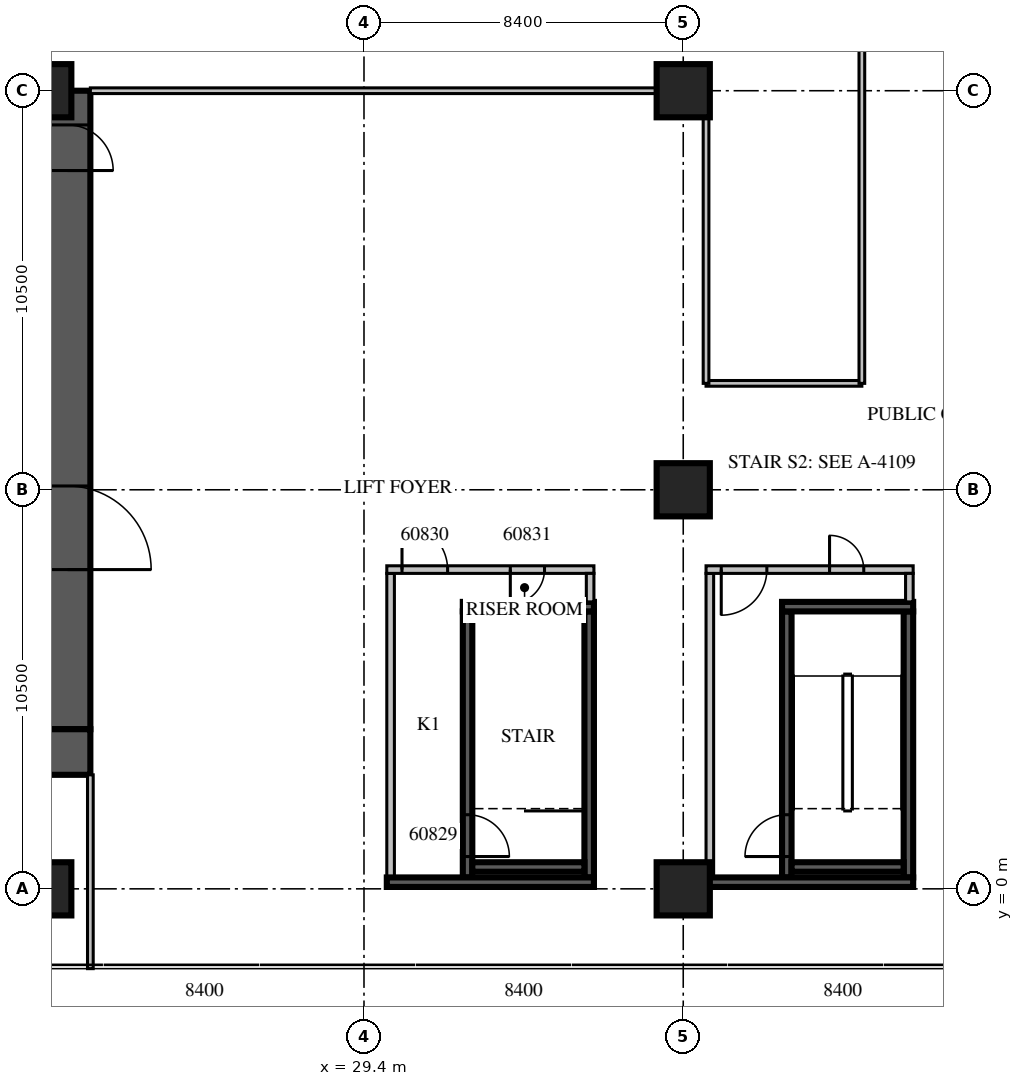
"""IFC4 building model, lengths in metres.
Left out: names, types, materials, properties, quantities, classifications, styles, units other than length and angle.
Written with IfcOpenShell. Run it as: python <this file> out.ifc"""

import sys

from ifc_helpers import new_model, si_unit, direction, frame, frame_2d, origin, origin_2d, place, context, subcontext, project, spatial, rectangle, extrude, source, transform, mapped, element, fill, save


model = new_model("IFC4")
c1 = context("Model", 3, precision=1e-05, world=origin(), true_north=direction((0.0, 1.0)))
c2 = subcontext(c1, "Body", "Model", "MODEL_VIEW")
j1 = project(units=[si_unit("LENGTHUNIT", "METRE"), si_unit("PLANEANGLEUNIT", "RADIAN")], contexts=[c1])
p1 = place(None, origin())
s1 = spatial("IfcSite", under=j1, at=p1, CompositionType="ELEMENT")
p2 = place(p1, origin())
s2 = spatial("IfcBuilding", under=s1, at=p2, CompositionType="ELEMENT")
p3 = place(p2, frame((0.0, 0.0, 29.1)))
s3 = spatial("IfcBuildingStorey", under=s2, at=p3, CompositionType="ELEMENT", Elevation=29.1)
m1 = source(origin(), c2, "Body", "SweptSolid", [
    extrude(rectangle(XDim=1.4, YDim=1.4, at=origin_2d()), origin(), (0.0, 0.0, 1.0), 5.4),
])
for number, where, z_axis, x_axis in (
    (1, (21.0, 0.0, 0.0), (0.0, 0.0, 1.0), (1.0, 0.0, 0.0)),
    (2, (21.0, 21.0, 0.0), (0.0, 0.0, 1.0), (1.0, 0.0, 0.0)),
    (3, (37.8, 0.0, 0.0), (0.0, 0.0, 1.0), (1.0, 0.0, 0.0)),
    (4, (37.8, 10.5, 0.0), (0.0, 0.0, 1.0), (1.0, 0.0, 0.0)),
    (5, (37.8, 21.0, 0.0), (0.0, 0.0, 1.0), (1.0, 0.0, 0.0)),
):
    element("IfcColumn", number, at=place(p3, frame(where, z_axis=z_axis, x_axis=x_axis)), inside=s3, PredefinedType="COLUMN", context=c2, shape_type="MappedRepresentation", body=[
        mapped(m1, transform((0.0, 0.0, 0.0), scale=1.0)),
    ])
m2 = source(origin(), c2, "Body", "SweptSolid", [
    extrude(rectangle(XDim=16.8, YDim=1.2, at=frame_2d((8.4, 0.0))), origin(), (0.0, 0.0, 1.0), 5.4),
])
p4 = place(p3, frame((21.6, 4.2, 0.0), z_axis=(0.0, 0.0, 1.0), x_axis=(0.0, 1.0, 0.0)))
e6 = element("IfcWall", 6, at=p4, inside=s3, PredefinedType="SHEAR", context=c2, shape_type="MappedRepresentation", body=[
    mapped(m2, transform((0.0, 0.0, 0.0), scale=1.0)),
])
m3 = source(origin(), c2, "Body", "SweptSolid", [
    extrude(rectangle(XDim=2.2, YDim=2.1, at=frame_2d((1.1, 1.05))), frame((0.0, 0.61, 0.0), z_axis=(0.0, -1.0, 0.0), x_axis=(1.0, 0.0, 0.0)), (0.0, 0.0, 1.0), 1.22),
])
p5 = place(p4, frame((4.2, 0.0, 0.0)))
e7 = element("IfcOpeningElement", 7, at=p5, cuts=e6, PredefinedType="OPENING", context=c2, shape_type="MappedRepresentation", body=[
    mapped(m3, transform((0.0, 0.0, 0.0), scale=1.0)),
])
m4 = source(origin(), c2, "Body", "SweptSolid", [
    extrude(rectangle(XDim=1.2, YDim=2.1, at=frame_2d((0.6, 1.05))), frame((0.0, 0.61, 0.0), z_axis=(0.0, -1.0, 0.0), x_axis=(1.0, 0.0, 0.0)), (0.0, 0.0, 1.0), 1.22),
])
p6 = place(p4, frame((14.7, 0.0, 0.0)))
e8 = element("IfcOpeningElement", 8, at=p6, cuts=e6, PredefinedType="OPENING", context=c2, shape_type="MappedRepresentation", body=[
    mapped(m4, transform((0.0, 0.0, 0.0), scale=1.0)),
])
m5 = source(origin(), c2, "Body", "SweptSolid", [
    extrude(rectangle(XDim=18.0, YDim=1.2, at=frame_2d((9.0, 0.0))), origin(), (0.0, 0.0, 1.0), 5.4),
])
p7 = place(p3, frame((4.2, 3.6, 0.0), z_axis=(0.0, 0.0, 1.0), x_axis=(1.0, 0.0, 0.0)))
e9 = element("IfcWall", 9, at=p7, inside=s3, PredefinedType="SHEAR", context=c2, shape_type="MappedRepresentation", body=[
    mapped(m5, transform((0.0, 0.0, 0.0), scale=1.0)),
])
m6 = source(origin(), c2, "Body", "SweptSolid", [
    extrude(rectangle(XDim=7.0, YDim=0.25, at=frame_2d((3.5, 0.0))), origin(), (0.0, 0.0, 1.0), 4.8),
])
p8 = place(p3, frame((40.525, 0.3, 0.0), z_axis=(0.0, 0.0, 1.0), x_axis=(0.0, 1.0, 0.0)))
e10 = element("IfcWall", 10, at=p8, inside=s3, PredefinedType="SOLIDWALL", context=c2, shape_type="MappedRepresentation", body=[
    mapped(m6, transform((0.0, 0.0, 0.0), scale=1.0)),
])
m7 = source(origin(), c2, "Body", "SweptSolid", [
    extrude(rectangle(XDim=1.1, YDim=2.1, at=frame_2d((0.55, 1.05))), frame((0.0, 0.135, 0.0), z_axis=(0.0, -1.0, 0.0), x_axis=(1.0, 0.0, 0.0)), (0.0, 0.0, 1.0), 0.27),
])
p9 = place(p8, frame((0.55, 0.0, 0.0)))
e11 = element("IfcOpeningElement", 11, at=p9, cuts=e10, PredefinedType="OPENING", context=c2, shape_type="MappedRepresentation", body=[
    mapped(m7, transform((0.0, 0.0, 0.0), scale=1.0)),
])
p10 = place(p3, frame((43.725, 0.3, 0.0), z_axis=(0.0, 0.0, 1.0), x_axis=(0.0, 1.0, 0.0)))
e12 = element("IfcWall", 12, at=p10, inside=s3, PredefinedType="SOLIDWALL", context=c2, shape_type="MappedRepresentation", body=[
    mapped(m6, transform((0.0, 0.0, 0.0), scale=1.0)),
])
m8 = source(origin(), c2, "Body", "SweptSolid", [
    extrude(rectangle(XDim=3.45, YDim=0.25, at=frame_2d((1.725, 0.0))), origin(), (0.0, 0.0, 1.0), 4.8),
])
p11 = place(p3, frame((40.4, 7.425, 0.0), z_axis=(0.0, 0.0, 1.0), x_axis=(1.0, 0.0, 0.0)))
e13 = element("IfcWall", 13, at=p11, inside=s3, PredefinedType="SOLIDWALL", context=c2, shape_type="MappedRepresentation", body=[
    mapped(m8, transform((0.0, 0.0, 0.0), scale=1.0)),
])
m9 = source(origin(), c2, "Body", "SweptSolid", [
    extrude(rectangle(XDim=2.95, YDim=0.25, at=frame_2d((1.475, 0.0))), origin(), (0.0, 0.0, 1.0), 4.8),
])
p12 = place(p3, frame((40.65, 0.575, 0.0), z_axis=(0.0, 0.0, 1.0), x_axis=(1.0, 0.0, 0.0)))
e14 = element("IfcWall", 14, at=p12, inside=s3, PredefinedType="SOLIDWALL", context=c2, shape_type="MappedRepresentation", body=[
    mapped(m9, transform((0.0, 0.0, 0.0), scale=1.0)),
])
m10 = source(origin(), c2, "Body", "SweptSolid", [
    extrude(rectangle(XDim=8.0, YDim=0.2, at=frame_2d((4.0, 0.0))), origin(), (0.0, 0.0, 1.0), 4.8),
])
p13 = place(p3, frame((38.5, 0.3, 0.0), z_axis=(0.0, 0.0, 1.0), x_axis=(0.0, 1.0, 0.0)))
e15 = element("IfcWall", 15, at=p13, inside=s3, PredefinedType="PARTITIONING", context=c2, shape_type="MappedRepresentation", body=[
    mapped(m10, transform((0.0, 0.0, 0.0), scale=1.0)),
])
m11 = source(origin(), c2, "Body", "SweptSolid", [
    extrude(rectangle(XDim=5.45, YDim=0.2, at=frame_2d((2.725, 0.0))), origin(), (0.0, 0.0, 1.0), 4.8),
])
p14 = place(p3, frame((38.4, 8.4, 0.0), z_axis=(0.0, 0.0, 1.0), x_axis=(1.0, 0.0, 0.0)))
e16 = element("IfcWall", 16, at=p14, inside=s3, PredefinedType="PARTITIONING", context=c2, shape_type="MappedRepresentation", body=[
    mapped(m11, transform((0.0, 0.0, 0.0), scale=1.0)),
])
m12 = source(origin(), c2, "Body", "SweptSolid", [
    extrude(rectangle(XDim=1.2, YDim=2.1, at=frame_2d((0.6, 1.05))), frame((0.0, 0.11, 0.0), z_axis=(0.0, -1.0, 0.0), x_axis=(1.0, 0.0, 0.0)), (0.0, 0.0, 1.0), 0.22),
])
p15 = place(p14, frame((0.4, 0.0, 0.0)))
e17 = element("IfcOpeningElement", 17, at=p15, cuts=e16, PredefinedType="OPENING", context=c2, shape_type="MappedRepresentation", body=[
    mapped(m12, transform((0.0, 0.0, 0.0), scale=1.0)),
])
m13 = source(origin(), c2, "Body", "SweptSolid", [
    extrude(rectangle(XDim=0.9, YDim=2.1, at=frame_2d((0.45, 1.05))), frame((0.0, 0.11, 0.0), z_axis=(0.0, -1.0, 0.0), x_axis=(1.0, 0.0, 0.0)), (0.0, 0.0, 1.0), 0.22),
])
p16 = place(p14, frame((3.25, 0.0, 0.0)))
e18 = element("IfcOpeningElement", 18, at=p16, cuts=e16, PredefinedType="OPENING", context=c2, shape_type="MappedRepresentation", body=[
    mapped(m13, transform((0.0, 0.0, 0.0), scale=1.0)),
])
m14 = source(origin(), c2, "Body", "SweptSolid", [
    extrude(rectangle(XDim=0.75, YDim=0.2, at=frame_2d((0.375, 0.0))), origin(), (0.0, 0.0, 1.0), 4.8),
])
p17 = place(p3, frame((43.75, 7.55, 0.0), z_axis=(0.0, 0.0, 1.0), x_axis=(0.0, 1.0, 0.0)))
e19 = element("IfcWall", 19, at=p17, inside=s3, PredefinedType="PARTITIONING", context=c2, shape_type="MappedRepresentation", body=[
    mapped(m14, transform((0.0, 0.0, 0.0), scale=1.0)),
])
m15 = source(origin(), c2, "Body", "SweptSolid", [
    extrude(rectangle(XDim=5.45, YDim=0.25, at=frame_2d((2.725, 0.0))), origin(), (0.0, 0.0, 1.0), 4.8),
])
p18 = place(p3, frame((38.4, 0.175, 0.0), z_axis=(0.0, 0.0, 1.0), x_axis=(1.0, 0.0, 0.0)))
e20 = element("IfcWall", 20, at=p18, inside=s3, PredefinedType="SOLIDWALL", context=c2, shape_type="MappedRepresentation", body=[
    mapped(m15, transform((0.0, 0.0, 0.0), scale=1.0)),
])
p19 = place(p3, frame((32.125, 0.3, 0.0), z_axis=(0.0, 0.0, 1.0), x_axis=(0.0, 1.0, 0.0)))
e21 = element("IfcWall", 21, at=p19, inside=s3, PredefinedType="SOLIDWALL", context=c2, shape_type="MappedRepresentation", body=[
    mapped(m6, transform((0.0, 0.0, 0.0), scale=1.0)),
])
p20 = place(p19, frame((0.55, 0.0, 0.0)))
e22 = element("IfcOpeningElement", 22, at=p20, cuts=e21, PredefinedType="OPENING", context=c2, shape_type="MappedRepresentation", body=[
    mapped(m7, transform((0.0, 0.0, 0.0), scale=1.0)),
])
p21 = place(p3, frame((35.325, 0.3, 0.0), z_axis=(0.0, 0.0, 1.0), x_axis=(0.0, 1.0, 0.0)))
e23 = element("IfcWall", 23, at=p21, inside=s3, PredefinedType="SOLIDWALL", context=c2, shape_type="MappedRepresentation", body=[
    mapped(m6, transform((0.0, 0.0, 0.0), scale=1.0)),
])
p22 = place(p3, frame((32.0, 7.425, 0.0), z_axis=(0.0, 0.0, 1.0), x_axis=(1.0, 0.0, 0.0)))
e24 = element("IfcWall", 24, at=p22, inside=s3, PredefinedType="SOLIDWALL", context=c2, shape_type="MappedRepresentation", body=[
    mapped(m8, transform((0.0, 0.0, 0.0), scale=1.0)),
])
p23 = place(p3, frame((32.25, 0.575, 0.0), z_axis=(0.0, 0.0, 1.0), x_axis=(1.0, 0.0, 0.0)))
e25 = element("IfcWall", 25, at=p23, inside=s3, PredefinedType="SOLIDWALL", context=c2, shape_type="MappedRepresentation", body=[
    mapped(m9, transform((0.0, 0.0, 0.0), scale=1.0)),
])
p24 = place(p3, frame((30.1, 0.3, 0.0), z_axis=(0.0, 0.0, 1.0), x_axis=(0.0, 1.0, 0.0)))
e26 = element("IfcWall", 26, at=p24, inside=s3, PredefinedType="PARTITIONING", context=c2, shape_type="MappedRepresentation", body=[
    mapped(m10, transform((0.0, 0.0, 0.0), scale=1.0)),
])
p25 = place(p3, frame((30.0, 8.4, 0.0), z_axis=(0.0, 0.0, 1.0), x_axis=(1.0, 0.0, 0.0)))
e27 = element("IfcWall", 27, at=p25, inside=s3, PredefinedType="PARTITIONING", context=c2, shape_type="MappedRepresentation", body=[
    mapped(m11, transform((0.0, 0.0, 0.0), scale=1.0)),
])
p26 = place(p25, frame((0.4, 0.0, 0.0)))
e28 = element("IfcOpeningElement", 28, at=p26, cuts=e27, PredefinedType="OPENING", context=c2, shape_type="MappedRepresentation", body=[
    mapped(m12, transform((0.0, 0.0, 0.0), scale=1.0)),
])
p27 = place(p25, frame((3.25, 0.0, 0.0)))
e29 = element("IfcOpeningElement", 29, at=p27, cuts=e27, PredefinedType="OPENING", context=c2, shape_type="MappedRepresentation", body=[
    mapped(m13, transform((0.0, 0.0, 0.0), scale=1.0)),
])
p28 = place(p3, frame((35.35, 7.55, 0.0), z_axis=(0.0, 0.0, 1.0), x_axis=(0.0, 1.0, 0.0)))
e30 = element("IfcWall", 30, at=p28, inside=s3, PredefinedType="PARTITIONING", context=c2, shape_type="MappedRepresentation", body=[
    mapped(m14, transform((0.0, 0.0, 0.0), scale=1.0)),
])
p29 = place(p3, frame((30.0, 0.175, 0.0), z_axis=(0.0, 0.0, 1.0), x_axis=(1.0, 0.0, 0.0)))
e31 = element("IfcWall", 31, at=p29, inside=s3, PredefinedType="SOLIDWALL", context=c2, shape_type="MappedRepresentation", body=[
    mapped(m15, transform((0.0, 0.0, 0.0), scale=1.0)),
])
m16 = source(origin(), c2, "Body", "SweptSolid", [
    extrude(rectangle(XDim=4.1, YDim=0.15, at=frame_2d((2.05, 0.0))), origin(), (0.0, 0.0, 1.0), 4.8),
])
p30 = place(p3, frame((38.4, 13.3, 0.0), z_axis=(0.0, 0.0, 1.0), x_axis=(1.0, 0.0, 0.0)))
e32 = element("IfcWall", 32, at=p30, inside=s3, PredefinedType="PARTITIONING", context=c2, shape_type="MappedRepresentation", body=[
    mapped(m16, transform((0.0, 0.0, 0.0), scale=1.0)),
])
m17 = source(origin(), c2, "Body", "SweptSolid", [
    extrude(rectangle(XDim=16.2, YDim=0.15, at=frame_2d((8.1, 0.0))), origin(), (0.0, 0.0, 1.0), 4.8),
])
p31 = place(p3, frame((22.2, 21.0, 0.0), z_axis=(0.0, 0.0, 1.0), x_axis=(1.0, 0.0, 0.0)))
e33 = element("IfcWall", 33, at=p31, inside=s3, PredefinedType="PARTITIONING", context=c2, shape_type="MappedRepresentation", body=[
    mapped(m17, transform((0.0, 0.0, 0.0), scale=1.0)),
])
m18 = source(origin(), c2, "Body", "SweptSolid", [
    extrude(rectangle(XDim=5.1, YDim=0.15, at=frame_2d((2.55, 0.0))), origin(), (0.0, 0.0, 1.0), 4.8),
])
p32 = place(p3, frame((22.2, -2.1, 0.0), z_axis=(0.0, 0.0, 1.0), x_axis=(0.0, 1.0, 0.0)))
e34 = element("IfcWall", 34, at=p32, inside=s3, PredefinedType="PARTITIONING", context=c2, shape_type="MappedRepresentation", body=[
    mapped(m18, transform((0.0, 0.0, 0.0), scale=1.0)),
])
m19 = source(origin(), c2, "Body", "SweptSolid", [
    extrude(rectangle(XDim=7.7, YDim=0.15, at=frame_2d((3.85, 0.0))), origin(), (0.0, 0.0, 1.0), 4.8),
])
p33 = place(p3, frame((38.4, 13.3, 0.0), z_axis=(0.0, 0.0, 1.0), x_axis=(0.0, 1.0, 0.0)))
e35 = element("IfcWall", 35, at=p33, inside=s3, PredefinedType="PARTITIONING", context=c2, shape_type="MappedRepresentation", body=[
    mapped(m19, transform((0.0, 0.0, 0.0), scale=1.0)),
])
m20 = source(origin(), c2, "Body", "SweptSolid", [
    extrude(rectangle(XDim=26.6, YDim=0.15, at=frame_2d((13.3, 0.0))), origin(), (0.0, 0.0, 1.0), 4.8),
])
p34 = place(p3, frame((42.5, 13.3, 0.0), z_axis=(0.0, 0.0, 1.0), x_axis=(0.0, 1.0, 0.0)))
e36 = element("IfcWall", 36, at=p34, inside=s3, PredefinedType="PARTITIONING", context=c2, shape_type="MappedRepresentation", body=[
    mapped(m20, transform((0.0, 0.0, 0.0), scale=1.0)),
])
m21 = source(origin(), c2, "Body", "SweptSolid", [
    extrude(rectangle(XDim=1.8, YDim=2.1, at=frame_2d((0.9, 1.05))), frame((0.0, 0.085, 0.0), z_axis=(0.0, -1.0, 0.0), x_axis=(1.0, 0.0, 0.0)), (0.0, 0.0, 1.0), 0.17),
])
p35 = place(p34, frame((12.4, 0.0, 0.0)))
e37 = element("IfcOpeningElement", 37, at=p35, cuts=e36, PredefinedType="OPENING", context=c2, shape_type="MappedRepresentation", body=[
    mapped(m21, transform((0.0, 0.0, 0.0), scale=1.0)),
])
m22 = source(origin(), c2, "Body", "SweptSolid", [
    extrude(rectangle(XDim=1.1, YDim=2.1, at=frame_2d((0.55, 1.05))), frame((0.0, 0.025, 0.0), z_axis=(0.0, -1.0, 0.0), x_axis=(1.0, 0.0, 0.0)), (0.0, 0.0, 1.0), 0.05),
])
p36 = place(p9, origin())
e38 = element("IfcDoor", 38, at=p36, inside=s3, OperationType="SINGLE_SWING_LEFT", PredefinedType="DOOR", context=c2, shape_type="MappedRepresentation", body=[
    mapped(m22, transform((0.0, 0.0, 0.0), scale=1.0)),
])
fill(e11, e38)
m23 = source(origin(), c2, "Body", "SweptSolid", [
    extrude(rectangle(XDim=1.2, YDim=2.1, at=frame_2d((0.6, 1.05))), frame((0.0, 0.025, 0.0), z_axis=(0.0, -1.0, 0.0), x_axis=(1.0, 0.0, 0.0)), (0.0, 0.0, 1.0), 0.05),
])
p37 = place(p15, origin())
e39 = element("IfcDoor", 39, at=p37, inside=s3, OperationType="SINGLE_SWING_RIGHT", PredefinedType="DOOR", context=c2, shape_type="MappedRepresentation", body=[
    mapped(m23, transform((0.0, 0.0, 0.0), scale=1.0)),
])
fill(e17, e39)
m24 = source(origin(), c2, "Body", "SweptSolid", [
    extrude(rectangle(XDim=0.9, YDim=2.1, at=frame_2d((0.45, 1.05))), frame((0.0, 0.025, 0.0), z_axis=(0.0, -1.0, 0.0), x_axis=(1.0, 0.0, 0.0)), (0.0, 0.0, 1.0), 0.05),
])
p38 = place(p16, origin())
e40 = element("IfcDoor", 40, at=p38, inside=s3, OperationType="SINGLE_SWING_LEFT", PredefinedType="DOOR", context=c2, shape_type="MappedRepresentation", body=[
    mapped(m24, transform((0.0, 0.0, 0.0), scale=1.0)),
])
fill(e18, e40)
p39 = place(p20, origin())
e41 = element("IfcDoor", 41, at=p39, inside=s3, OperationType="SINGLE_SWING_RIGHT", PredefinedType="DOOR", context=c2, shape_type="MappedRepresentation", body=[
    mapped(m22, transform((0.0, 0.0, 0.0), scale=1.0)),
])
fill(e22, e41)
p40 = place(p26, origin())
e42 = element("IfcDoor", 42, at=p40, inside=s3, OperationType="SINGLE_SWING_LEFT", PredefinedType="DOOR", context=c2, shape_type="MappedRepresentation", body=[
    mapped(m23, transform((0.0, 0.0, 0.0), scale=1.0)),
])
fill(e28, e42)
p41 = place(p27, origin())
e43 = element("IfcDoor", 43, at=p41, inside=s3, OperationType="SINGLE_SWING_RIGHT", PredefinedType="DOOR", context=c2, shape_type="MappedRepresentation", body=[
    mapped(m24, transform((0.0, 0.0, 0.0), scale=1.0)),
])
fill(e29, e43)
m25 = source(origin(), c2, "Body", "SweptSolid", [
    extrude(rectangle(XDim=2.2, YDim=2.1, at=frame_2d((1.1, 1.05))), frame((0.0, 0.025, 0.0), z_axis=(0.0, -1.0, 0.0), x_axis=(1.0, 0.0, 0.0)), (0.0, 0.0, 1.0), 0.05),
])
p42 = place(p5, origin())
e44 = element("IfcDoor", 44, at=p42, inside=s3, OperationType="DOUBLE_DOOR_SINGLE_SWING", PredefinedType="DOOR", context=c2, shape_type="MappedRepresentation", body=[
    mapped(m25, transform((0.0, 0.0, 0.0), scale=1.0)),
])
fill(e7, e44)
p43 = place(p6, origin())
e45 = element("IfcDoor", 45, at=p43, inside=s3, OperationType="SINGLE_SWING_RIGHT", PredefinedType="DOOR", context=c2, shape_type="MappedRepresentation", body=[
    mapped(m23, transform((0.0, 0.0, 0.0), scale=1.0)),
])
fill(e8, e45)
save(model, sys.argv[1])
